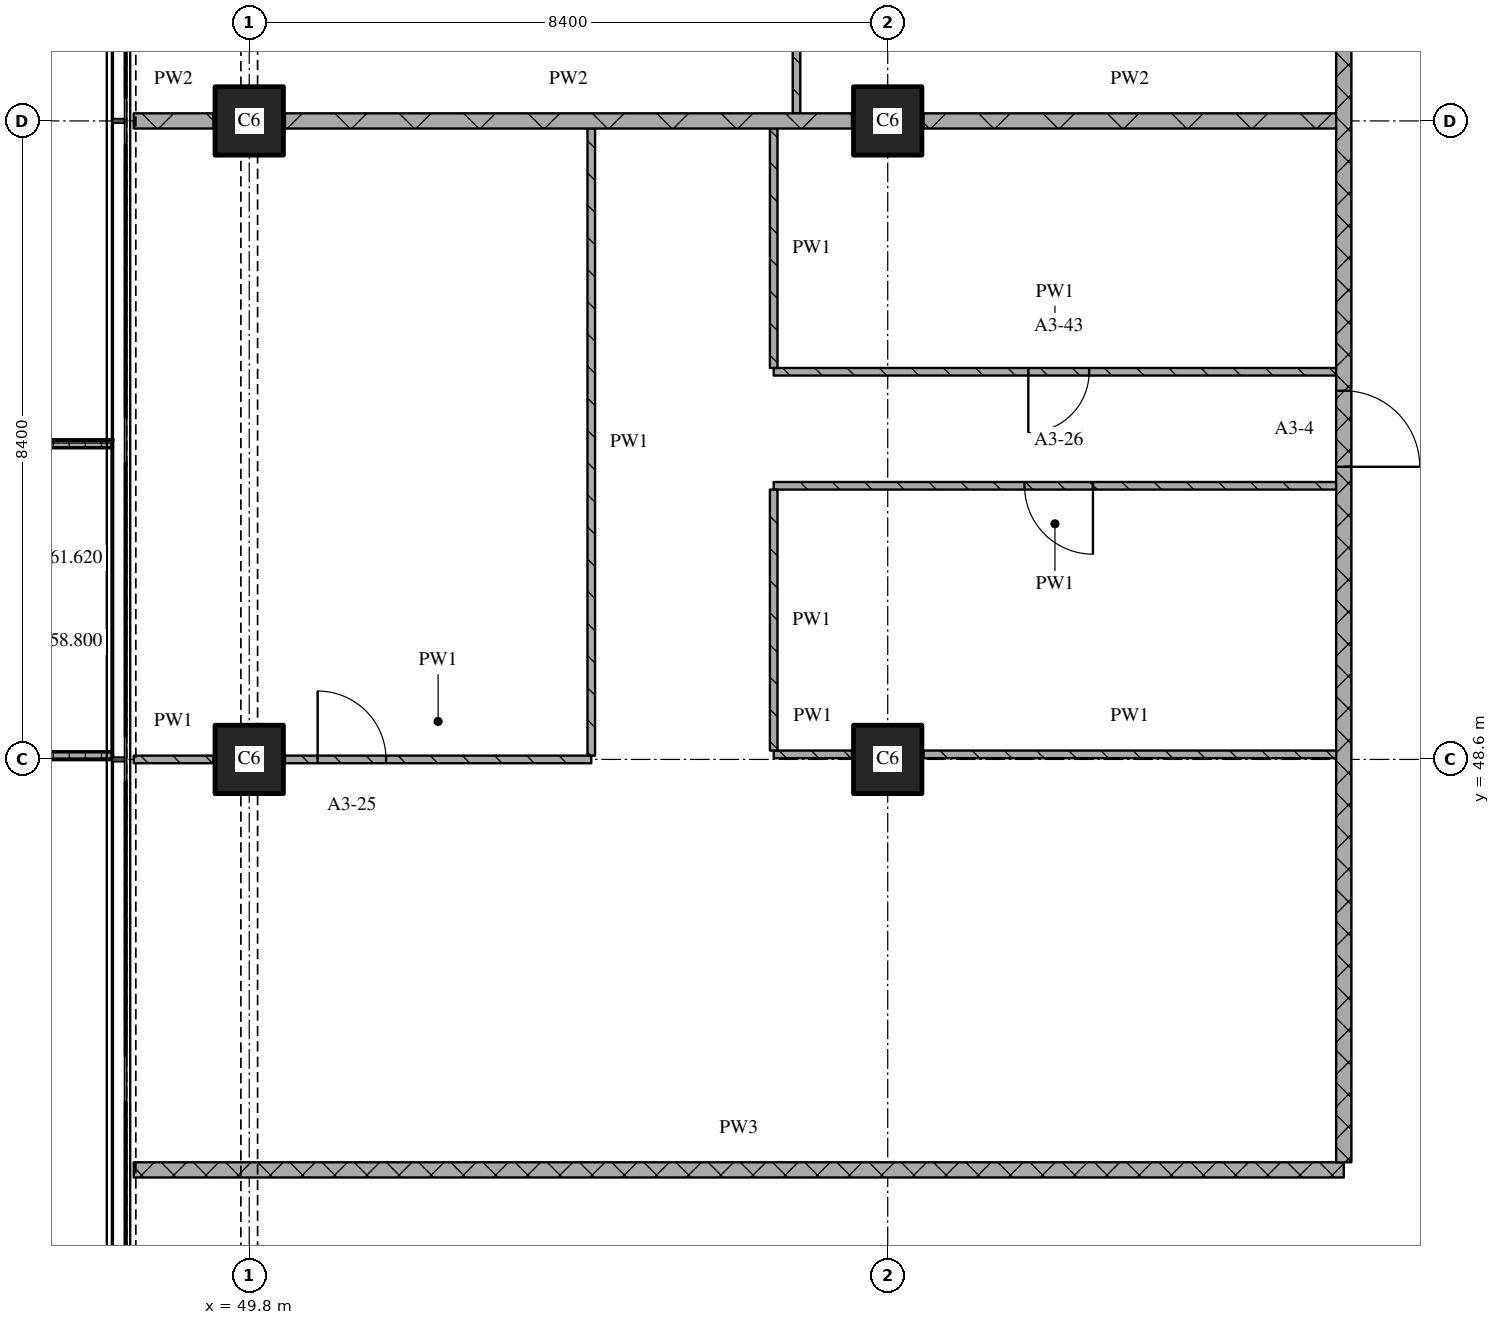
"""IFC4 building model, lengths in metres.
Left out: names, types, materials, properties, quantities, classifications, styles, units other than length and angle.
Written with IfcOpenShell. Run it as: python <this file> out.ifc"""

import sys

from ifc_helpers import new_model, si_unit, direction, frame, frame_2d, origin, origin_2d, place, context, subcontext, project, spatial, polyline, rectangle, outline, extrude, element, fill, save


model = new_model("IFC4")
c1 = context("Model", 3, precision=1e-05, world=origin(), true_north=direction((0.0, 1.0)))
c2 = subcontext(c1, "Body", "Model", "MODEL_VIEW")
j1 = project(units=[si_unit("LENGTHUNIT", "METRE"), si_unit("PLANEANGLEUNIT", "RADIAN")], contexts=[c1])
p1 = place(None, origin())
s1 = spatial("IfcSite", under=j1, at=p1, CompositionType="ELEMENT")
p2 = place(p1, origin())
s2 = spatial("IfcBuilding", under=s1, at=p2, CompositionType="ELEMENT")
p3 = place(p2, frame((0.0, 0.0, 58.8)))
s3 = spatial("IfcBuildingStorey", under=s2, at=p3, CompositionType="ELEMENT", Elevation=58.8)
for number, where, z_axis, x_axis in (
    (1, (49.8, 48.6, 0.0), (0.0, 0.0, 1.0), (1.0, 0.0, 0.0)),
    (2, (49.8, 57.0, 0.0), (0.0, 0.0, 1.0), (1.0, 0.0, 0.0)),
    (3, (58.2, 48.6, 0.0), (0.0, 0.0, 1.0), (1.0, 0.0, 0.0)),
    (4, (58.2, 57.0, 0.0), (0.0, 0.0, 1.0), (1.0, 0.0, 0.0)),
):
    element("IfcColumn", number, at=place(p3, frame(where, z_axis=z_axis, x_axis=x_axis)), inside=s3, PredefinedType="COLUMN", context=c2, shape_type="SweptSolid", body=[
        extrude(rectangle(XDim=0.9, YDim=0.9, at=origin_2d()), origin(), (0.0, 0.0, 1.0), 3.6),
    ])
p4 = place(p3, origin())
e5 = element("IfcWall", 5, at=p4, inside=s3, PredefinedType="SOLIDWALL", context=c2, shape_type="SweptSolid", body=[
    extrude(outline(polyline([(48.0, 52.8), (48.0, 52.7), (46.367, 52.7), (46.367, 48.7), (48.0, 48.7), (48.0, 48.6), (46.267, 48.6), (46.267, 52.8), (48.0, 52.8)])), origin(), (0.0, 0.0, 1.0), 1.0),
])
p5 = place(p3, frame((48.28, 43.2, 0.0), z_axis=(0.0, 0.0, 1.0), x_axis=(1.0, 0.0, 0.0)))
e6 = element("IfcWall", 6, at=p5, inside=s3, PredefinedType="PARTITIONING", context=c2, shape_type="SweptSolid", body=[
    extrude(rectangle(XDim=15.92, YDim=0.2, at=frame_2d((7.96, 0.0))), origin(), (0.0, 0.0, 1.0), 3.32),
])
p6 = place(p3, frame((48.28, 48.6, 0.0), z_axis=(0.0, 0.0, 1.0), x_axis=(1.0, 0.0, 0.0)))
e7 = element("IfcWall", 7, at=p6, inside=s3, PredefinedType="PARTITIONING", context=c2, shape_type="SweptSolid", body=[
    extrude(rectangle(XDim=1.05, YDim=0.1, at=frame_2d((0.525, 0.0))), origin(), (0.0, 0.0, 1.0), 3.32),
])
p7 = place(p3, frame((50.27, 48.6, 0.0), z_axis=(0.0, 0.0, 1.0), x_axis=(1.0, 0.0, 0.0)))
e8 = element("IfcWall", 8, at=p7, inside=s3, PredefinedType="PARTITIONING", context=c2, shape_type="SweptSolid", body=[
    extrude(rectangle(XDim=4.03, YDim=0.1, at=frame_2d((2.015, 0.0))), origin(), (0.0, 0.0, 1.0), 3.32),
])
p8 = place(p7, frame((0.43, 0.0, 0.0)))
e9 = element("IfcOpeningElement", 9, at=p8, cuts=e8, PredefinedType="OPENING", context=c2, shape_type="SweptSolid", body=[
    extrude(rectangle(XDim=0.9, YDim=2.1, at=frame_2d((0.45, 1.05))), frame((0.0, 0.06, 0.0), z_axis=(0.0, -1.0, 0.0), x_axis=(1.0, 0.0, 0.0)), (0.0, 0.0, 1.0), 0.12),
])
p9 = place(p3, frame((56.7, 48.667, 0.0), z_axis=(0.0, 0.0, 1.0), x_axis=(1.0, 0.0, 0.0)))
e10 = element("IfcWall", 10, at=p9, inside=s3, PredefinedType="PARTITIONING", context=c2, shape_type="SweptSolid", body=[
    extrude(rectangle(XDim=1.03, YDim=0.1, at=frame_2d((0.515, 0.0))), origin(), (0.0, 0.0, 1.0), 3.32),
])
p10 = place(p3, frame((58.67, 48.667, 0.0), z_axis=(0.0, 0.0, 1.0), x_axis=(1.0, 0.0, 0.0)))
e11 = element("IfcWall", 11, at=p10, inside=s3, PredefinedType="PARTITIONING", context=c2, shape_type="SweptSolid", body=[
    extrude(rectangle(XDim=5.43, YDim=0.1, at=frame_2d((2.715, 0.0))), origin(), (0.0, 0.0, 1.0), 3.32),
])
p11 = place(p3, frame((64.1, 52.2, 0.0), z_axis=(0.0, 0.0, 1.0), x_axis=(-1.0, 0.0, 0.0)))
e12 = element("IfcWall", 12, at=p11, inside=s3, PredefinedType="PARTITIONING", context=c2, shape_type="SweptSolid", body=[
    extrude(rectangle(XDim=7.4, YDim=0.1, at=frame_2d((3.7, 0.0))), origin(), (0.0, 0.0, 1.0), 3.32),
])
p12 = place(p11, frame((3.2, 0.0, 0.0)))
e13 = element("IfcOpeningElement", 13, at=p12, cuts=e12, PredefinedType="OPENING", context=c2, shape_type="SweptSolid", body=[
    extrude(rectangle(XDim=0.9, YDim=2.1, at=frame_2d((0.45, 1.05))), frame((0.0, 0.06, 0.0), z_axis=(0.0, -1.0, 0.0), x_axis=(1.0, 0.0, 0.0)), (0.0, 0.0, 1.0), 0.12),
])
p13 = place(p3, frame((56.7, 53.7, 0.0), z_axis=(0.0, 0.0, 1.0), x_axis=(1.0, 0.0, 0.0)))
e14 = element("IfcWall", 14, at=p13, inside=s3, PredefinedType="PARTITIONING", context=c2, shape_type="SweptSolid", body=[
    extrude(rectangle(XDim=7.4, YDim=0.1, at=frame_2d((3.7, 0.0))), origin(), (0.0, 0.0, 1.0), 3.32),
])
p14 = place(p13, frame((3.35, 0.0, 0.0)))
e15 = element("IfcOpeningElement", 15, at=p14, cuts=e14, PredefinedType="OPENING", context=c2, shape_type="SweptSolid", body=[
    extrude(rectangle(XDim=0.8, YDim=2.1, at=frame_2d((0.4, 1.05))), frame((0.0, 0.06, 0.0), z_axis=(0.0, -1.0, 0.0), x_axis=(1.0, 0.0, 0.0)), (0.0, 0.0, 1.0), 0.12),
])
p15 = place(p3, frame((48.28, 57.0, 0.0), z_axis=(0.0, 0.0, 1.0), x_axis=(1.0, 0.0, 0.0)))
e16 = element("IfcWall", 16, at=p15, inside=s3, PredefinedType="PARTITIONING", context=c2, shape_type="SweptSolid", body=[
    extrude(rectangle(XDim=1.05, YDim=0.2, at=frame_2d((0.525, 0.0))), origin(), (0.0, 0.0, 1.0), 3.32),
])
p16 = place(p3, frame((50.27, 57.0, 0.0), z_axis=(0.0, 0.0, 1.0), x_axis=(1.0, 0.0, 0.0)))
e17 = element("IfcWall", 17, at=p16, inside=s3, PredefinedType="PARTITIONING", context=c2, shape_type="SweptSolid", body=[
    extrude(rectangle(XDim=7.46, YDim=0.2, at=frame_2d((3.73, 0.0))), origin(), (0.0, 0.0, 1.0), 3.32),
])
p17 = place(p3, frame((58.67, 57.0, 0.0), z_axis=(0.0, 0.0, 1.0), x_axis=(1.0, 0.0, 0.0)))
e18 = element("IfcWall", 18, at=p17, inside=s3, PredefinedType="PARTITIONING", context=c2, shape_type="SweptSolid", body=[
    extrude(rectangle(XDim=5.43, YDim=0.2, at=frame_2d((2.715, 0.0))), origin(), (0.0, 0.0, 1.0), 3.32),
])
p18 = place(p3, frame((54.3, 56.9, 0.0), z_axis=(0.0, 0.0, 1.0), x_axis=(0.0, -1.0, 0.0)))
e19 = element("IfcWall", 19, at=p18, inside=s3, PredefinedType="PARTITIONING", context=c2, shape_type="SweptSolid", body=[
    extrude(rectangle(XDim=8.25, YDim=0.1, at=frame_2d((4.125, 0.0))), origin(), (0.0, 0.0, 1.0), 3.32),
])
p19 = place(p3, frame((56.7, 52.15, 0.0), z_axis=(0.0, 0.0, 1.0), x_axis=(0.0, -1.0, 0.0)))
e20 = element("IfcWall", 20, at=p19, inside=s3, PredefinedType="PARTITIONING", context=c2, shape_type="SweptSolid", body=[
    extrude(rectangle(XDim=3.433, YDim=0.1, at=frame_2d((1.717, 0.0))), origin(), (0.0, 0.0, 1.0), 3.32),
])
p20 = place(p3, frame((56.7, 56.9, 0.0), z_axis=(0.0, 0.0, 1.0), x_axis=(0.0, -1.0, 0.0)))
e21 = element("IfcWall", 21, at=p20, inside=s3, PredefinedType="PARTITIONING", context=c2, shape_type="SweptSolid", body=[
    extrude(rectangle(XDim=3.15, YDim=0.1, at=frame_2d((1.575, 0.0))), origin(), (0.0, 0.0, 1.0), 3.32),
])
p21 = place(p3, frame((57.0, 62.05, 0.0), z_axis=(0.0, 0.0, 1.0), x_axis=(0.0, -1.0, 0.0)))
e22 = element("IfcWall", 22, at=p21, inside=s3, PredefinedType="PARTITIONING", context=c2, shape_type="SweptSolid", body=[
    extrude(rectangle(XDim=4.95, YDim=0.1, at=frame_2d((2.475, 0.0))), origin(), (0.0, 0.0, 1.0), 3.32),
])
p22 = place(p21, frame((3.15, 0.0, 0.0)))
e23 = element("IfcOpeningElement", 23, at=p22, cuts=e22, PredefinedType="OPENING", context=c2, shape_type="SweptSolid", body=[
    extrude(rectangle(XDim=0.8, YDim=2.1, at=frame_2d((0.4, 1.05))), frame((0.0, 0.06, 0.0), z_axis=(0.0, -1.0, 0.0), x_axis=(1.0, 0.0, 0.0)), (0.0, 0.0, 1.0), 0.12),
])
p23 = place(p3, frame((64.2, 43.3, 0.0), z_axis=(0.0, 0.0, 1.0), x_axis=(0.0, 1.0, 0.0)))
e24 = element("IfcWall", 24, at=p23, inside=s3, PredefinedType="PARTITIONING", context=c2, shape_type="SweptSolid", body=[
    extrude(rectangle(XDim=32.02, YDim=0.2, at=frame_2d((16.01, 0.0))), origin(), (0.0, 0.0, 1.0), 3.32),
])
p24 = place(p23, frame((9.15, 0.0, 0.0)))
e25 = element("IfcOpeningElement", 25, at=p24, cuts=e24, PredefinedType="OPENING", context=c2, shape_type="SweptSolid", body=[
    extrude(rectangle(XDim=1.0, YDim=2.1, at=frame_2d((0.5, 1.05))), frame((0.0, 0.11, 0.0), z_axis=(0.0, -1.0, 0.0), x_axis=(1.0, 0.0, 0.0)), (0.0, 0.0, 1.0), 0.22),
])
p25 = place(p23, frame((19.05, 0.0, 0.0)))
e26 = element("IfcOpeningElement", 26, at=p25, cuts=e24, PredefinedType="OPENING", context=c2, shape_type="SweptSolid", body=[
    extrude(rectangle(XDim=1.0, YDim=2.1, at=frame_2d((0.5, 1.05))), frame((0.0, 0.11, 0.0), z_axis=(0.0, -1.0, 0.0), x_axis=(1.0, 0.0, 0.0)), (0.0, 0.0, 1.0), 0.22),
])
p26 = place(p8, origin())
e27 = element("IfcDoor", 27, at=p26, inside=s3, OperationType="SINGLE_SWING_LEFT", PredefinedType="DOOR", context=c2, shape_type="SweptSolid", body=[
    extrude(rectangle(XDim=0.9, YDim=2.1, at=frame_2d((0.45, 1.05))), frame((0.0, 0.025, 0.0), z_axis=(0.0, -1.0, 0.0), x_axis=(1.0, 0.0, 0.0)), (0.0, 0.0, 1.0), 0.05),
])
fill(e9, e27)
p27 = place(p12, origin())
e28 = element("IfcDoor", 28, at=p27, inside=s3, OperationType="SINGLE_SWING_LEFT", PredefinedType="DOOR", context=c2, shape_type="SweptSolid", body=[
    extrude(rectangle(XDim=0.9, YDim=2.1, at=frame_2d((0.45, 1.05))), frame((0.0, 0.025, 0.0), z_axis=(0.0, -1.0, 0.0), x_axis=(1.0, 0.0, 0.0)), (0.0, 0.0, 1.0), 0.05),
])
fill(e13, e28)
p28 = place(p14, origin())
e29 = element("IfcDoor", 29, at=p28, inside=s3, OperationType="SINGLE_SWING_RIGHT", PredefinedType="DOOR", context=c2, shape_type="SweptSolid", body=[
    extrude(rectangle(XDim=0.8, YDim=2.1, at=frame_2d((0.4, 1.05))), frame((0.0, 0.025, 0.0), z_axis=(0.0, -1.0, 0.0), x_axis=(1.0, 0.0, 0.0)), (0.0, 0.0, 1.0), 0.05),
])
fill(e15, e29)
p29 = place(p24, origin())
e30 = element("IfcDoor", 30, at=p29, inside=s3, OperationType="SINGLE_SWING_RIGHT", PredefinedType="DOOR", context=c2, shape_type="SweptSolid", body=[
    extrude(rectangle(XDim=1.0, YDim=2.1, at=frame_2d((0.5, 1.05))), frame((0.0, 0.025, 0.0), z_axis=(0.0, -1.0, 0.0), x_axis=(1.0, 0.0, 0.0)), (0.0, 0.0, 1.0), 0.05),
])
fill(e25, e30)
save(model, sys.argv[1])
